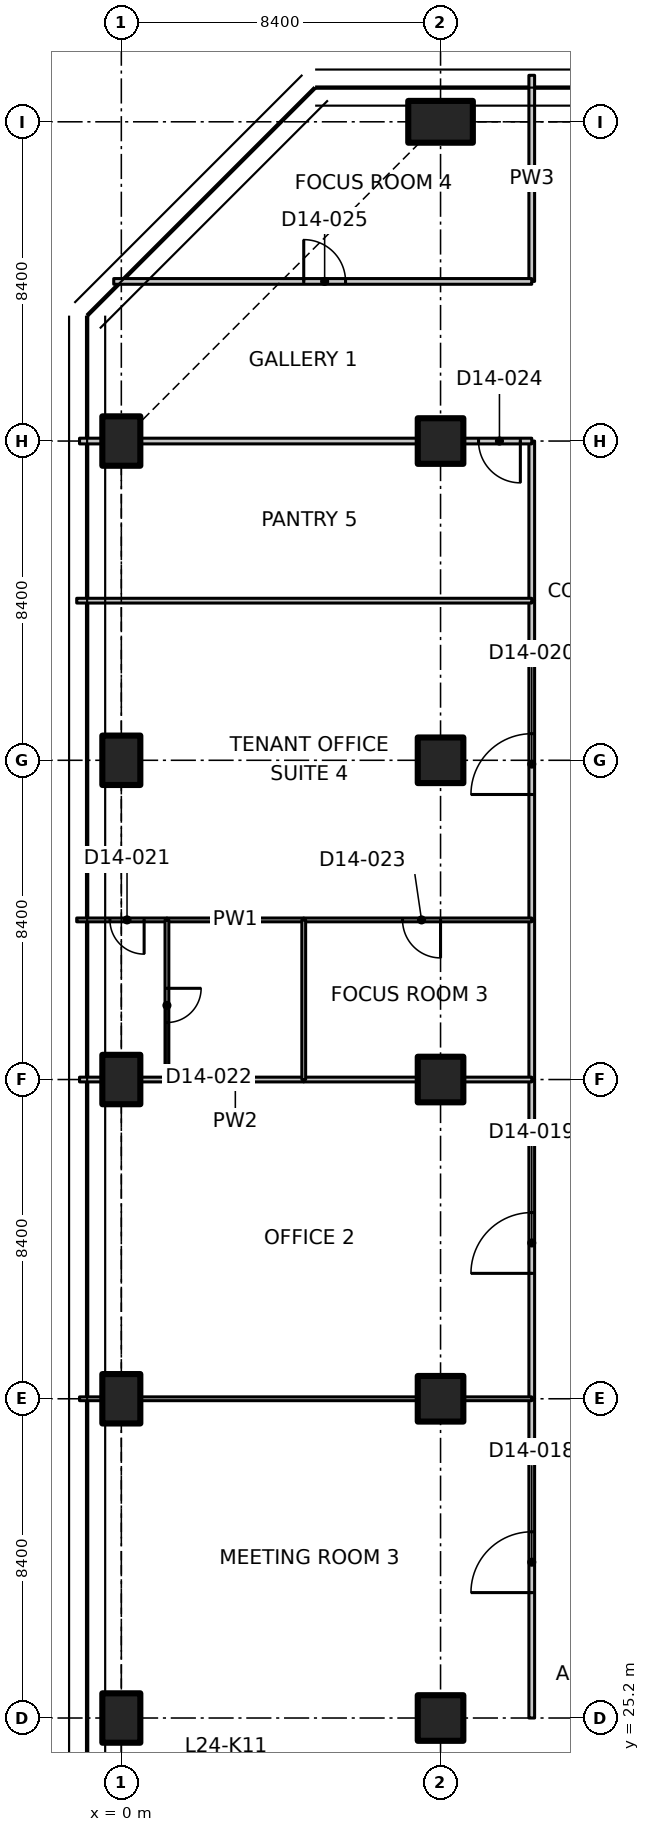
"""IFC4 building model, lengths in metres.
Left out: names, types, materials, properties, quantities, classifications, styles, units other than length and angle.
Written with IfcOpenShell. Run it as: python <this file> out.ifc"""

import sys

from ifc_helpers import new_model, si_unit, direction, frame, frame_2d, origin, origin_2d, place, context, subcontext, project, spatial, polyline, rectangle, outline, extrude, element, fill, save


model = new_model("IFC4")
c1 = context("Model", 3, precision=1e-05, world=origin(), true_north=direction((0.0, 1.0)))
c2 = subcontext(c1, "Body", "Model", "MODEL_VIEW")
j1 = project(units=[si_unit("LENGTHUNIT", "METRE"), si_unit("PLANEANGLEUNIT", "RADIAN")], contexts=[c1])
p1 = place(None, origin())
s1 = spatial("IfcSite", under=j1, at=p1, CompositionType="ELEMENT")
p2 = place(p1, origin())
s2 = spatial("IfcBuilding", under=s1, at=p2, CompositionType="ELEMENT")
p3 = place(p2, frame((0.0, 0.0, 102.5)))
s3 = spatial("IfcBuildingStorey", under=s2, at=p3, CompositionType="ELEMENT", Elevation=102.5)
for number, where, z_axis, x_axis in (
    (1, (0.0, 25.2, 0.0), (0.0, 0.0, 1.0), (1.0, 0.0, 0.0)),
    (2, (0.0, 33.6, 0.0), (0.0, 0.0, 1.0), (1.0, 0.0, 0.0)),
    (3, (0.0, 42.0, 0.0), (0.0, 0.0, 1.0), (1.0, 0.0, 0.0)),
    (4, (0.0, 50.4, 0.0), (0.0, 0.0, 1.0), (1.0, 0.0, 0.0)),
    (5, (0.0, 58.8, 0.0), (0.0, 0.0, 1.0), (1.0, 0.0, 0.0)),
):
    element("IfcColumn", number, at=place(p3, frame(where, z_axis=z_axis, x_axis=x_axis)), inside=s3, PredefinedType="COLUMN", context=c2, shape_type="SweptSolid", body=[
        extrude(rectangle(XDim=1.0, YDim=1.3, at=origin_2d()), origin(), (0.0, 0.0, 1.0), 3.35),
    ])
for number, where, z_axis, x_axis in (
    (6, (8.4, 25.2, 0.0), (0.0, 0.0, 1.0), (1.0, 0.0, 0.0)),
    (7, (8.4, 33.6, 0.0), (0.0, 0.0, 1.0), (1.0, 0.0, 0.0)),
    (8, (8.4, 42.0, 0.0), (0.0, 0.0, 1.0), (1.0, 0.0, 0.0)),
    (9, (8.4, 50.4, 0.0), (0.0, 0.0, 1.0), (1.0, 0.0, 0.0)),
    (10, (8.4, 58.8, 0.0), (0.0, 0.0, 1.0), (1.0, 0.0, 0.0)),
):
    element("IfcColumn", number, at=place(p3, frame(where, z_axis=z_axis, x_axis=x_axis)), inside=s3, PredefinedType="COLUMN", context=c2, shape_type="SweptSolid", body=[
        extrude(rectangle(XDim=1.2, YDim=1.2, at=origin_2d()), origin(), (0.0, 0.0, 1.0), 3.35),
    ])
p4 = place(p3, frame((8.4, 67.2, 0.0), z_axis=(0.0, 0.0, 1.0), x_axis=(0.0, 1.0, 0.0)))
e11 = element("IfcColumn", 11, at=p4, inside=s3, PredefinedType="COLUMN", context=c2, shape_type="SweptSolid", body=[
    extrude(rectangle(XDim=1.1, YDim=1.7, at=origin_2d()), origin(), (0.0, 0.0, 1.0), 3.35),
])
p5 = place(p3, frame((10.8, 25.2, 0.0), z_axis=(0.0, 0.0, 1.0), x_axis=(0.0, 1.0, 0.0)))
e12 = element("IfcWall", 12, at=p5, inside=s3, PredefinedType="PARTITIONING", context=c2, shape_type="SweptSolid", body=[
    extrude(rectangle(XDim=8.4, YDim=0.15, at=frame_2d((4.2, 0.0))), origin(), (0.0, 0.0, 1.0), 3.33),
])
p6 = place(p5, frame((3.3, 0.0, 0.0)))
e13 = element("IfcOpeningElement", 13, at=p6, cuts=e12, PredefinedType="OPENING", context=c2, shape_type="SweptSolid", body=[
    extrude(rectangle(XDim=1.6, YDim=2.1, at=frame_2d((0.8, 1.05))), frame((0.0, 0.085, 0.0), z_axis=(0.0, -1.0, 0.0), x_axis=(1.0, 0.0, 0.0)), (0.0, 0.0, 1.0), 0.17),
])
p7 = place(p3, frame((10.8, 33.6, 0.0), z_axis=(0.0, 0.0, 1.0), x_axis=(0.0, 1.0, 0.0)))
e14 = element("IfcWall", 14, at=p7, inside=s3, PredefinedType="PARTITIONING", context=c2, shape_type="SweptSolid", body=[
    extrude(rectangle(XDim=8.4, YDim=0.15, at=frame_2d((4.2, 0.0))), origin(), (0.0, 0.0, 1.0), 3.33),
])
p8 = place(p7, frame((3.3, 0.0, 0.0)))
e15 = element("IfcOpeningElement", 15, at=p8, cuts=e14, PredefinedType="OPENING", context=c2, shape_type="SweptSolid", body=[
    extrude(rectangle(XDim=1.6, YDim=2.1, at=frame_2d((0.8, 1.05))), frame((0.0, 0.085, 0.0), z_axis=(0.0, -1.0, 0.0), x_axis=(1.0, 0.0, 0.0)), (0.0, 0.0, 1.0), 0.17),
])
p9 = place(p3, frame((10.8, 46.2, 0.0), z_axis=(0.0, 0.0, 1.0), x_axis=(0.0, 1.0, 0.0)))
e16 = element("IfcWall", 16, at=p9, inside=s3, PredefinedType="PARTITIONING", context=c2, shape_type="SweptSolid", body=[
    extrude(rectangle(XDim=8.4, YDim=0.15, at=frame_2d((4.2, 0.0))), origin(), (0.0, 0.0, 1.0), 3.33),
])
p10 = place(p9, frame((3.3, 0.0, 0.0)))
e17 = element("IfcOpeningElement", 17, at=p10, cuts=e16, PredefinedType="OPENING", context=c2, shape_type="SweptSolid", body=[
    extrude(rectangle(XDim=1.6, YDim=2.1, at=frame_2d((0.8, 1.05))), frame((0.0, 0.085, 0.0), z_axis=(0.0, -1.0, 0.0), x_axis=(1.0, 0.0, 0.0)), (0.0, 0.0, 1.0), 0.17),
])
for number, where, z_axis, x_axis in (
    (18, (10.8, 42.0, 0.0), (0.0, 0.0, 1.0), (0.0, 1.0, 0.0)),
    (19, (10.8, 54.6, 0.0), (0.0, 0.0, 1.0), (0.0, 1.0, 0.0)),
):
    element("IfcWall", number, at=place(p3, frame(where, z_axis=z_axis, x_axis=x_axis)), inside=s3, PredefinedType="PARTITIONING", context=c2, shape_type="SweptSolid", body=[
        extrude(rectangle(XDim=4.2, YDim=0.15, at=frame_2d((2.1, 0.0))), origin(), (0.0, 0.0, 1.0), 3.33),
    ])
p11 = place(p3, frame((10.8, 63.0, 0.0), z_axis=(0.0, 0.0, 1.0), x_axis=(0.0, 1.0, 0.0)))
e20 = element("IfcWall", 20, at=p11, inside=s3, PredefinedType="PARTITIONING", context=c2, shape_type="SweptSolid", body=[
    extrude(outline(polyline([(0.0, 0.0), (5.423, 0.0), (5.423, 3.33), (5.28, 3.33), (4.65, 3.33), (4.648, 2.98), (3.752, 2.98), (3.75, 3.33), (0.0, 3.33), (0.0, 0.0)])), frame((0.0, 0.075, 0.0), z_axis=(0.0, -1.0, 0.0), x_axis=(1.0, 0.0, 0.0)), (0.0, 0.0, 1.0), 0.15),
])
p12 = place(p3, frame((10.8, 58.8, 0.0), z_axis=(0.0, 0.0, 1.0), x_axis=(-1.0, 0.0, 0.0)))
e21 = element("IfcWall", 21, at=p12, inside=s3, PredefinedType="PARTITIONING", context=c2, shape_type="SweptSolid", body=[
    extrude(rectangle(XDim=1.78, YDim=0.15, at=frame_2d((0.89, 0.0))), origin(), (0.0, 0.0, 1.0), 3.33),
])
p13 = place(p12, frame((0.3, 0.0, 0.0)))
e22 = element("IfcOpeningElement", 22, at=p13, cuts=e21, PredefinedType="OPENING", context=c2, shape_type="SweptSolid", body=[
    extrude(rectangle(XDim=1.1, YDim=2.1, at=frame_2d((0.55, 1.05))), frame((0.0, 0.085, 0.0), z_axis=(0.0, -1.0, 0.0), x_axis=(1.0, 0.0, 0.0)), (0.0, 0.0, 1.0), 0.17),
])
p14 = place(p3, frame((7.78, 58.8, 0.0), z_axis=(0.0, 0.0, 1.0), x_axis=(-1.0, 0.0, 0.0)))
e23 = element("IfcWall", 23, at=p14, inside=s3, PredefinedType="PARTITIONING", context=c2, shape_type="SweptSolid", body=[
    extrude(outline(polyline([(0.0, 0.0), (7.26, 0.0), (7.26, 2.98), (7.091, 2.98), (7.089, 3.33), (0.0, 3.33), (0.0, 0.0)])), frame((0.0, 0.075, 0.0), z_axis=(0.0, -1.0, 0.0), x_axis=(1.0, 0.0, 0.0)), (0.0, 0.0, 1.0), 0.15),
])
p15 = place(p3, frame((-0.52, 58.8, 0.0), z_axis=(0.0, 0.0, 1.0), x_axis=(-1.0, 0.0, 0.0)))
e24 = element("IfcWall", 24, at=p15, inside=s3, PredefinedType="PARTITIONING", context=c2, shape_type="SweptSolid", body=[
    extrude(rectangle(XDim=0.58, YDim=0.15, at=frame_2d((0.29, 0.0))), origin(), (0.0, 0.0, 1.0), 3.33),
])
p16 = place(p3, frame((-0.2, 63.0, 0.0), z_axis=(0.0, 0.0, 1.0), x_axis=(1.0, 0.0, 0.0)))
e25 = element("IfcWall", 25, at=p16, inside=s3, PredefinedType="PARTITIONING", context=c2, shape_type="SweptSolid", body=[
    extrude(outline(polyline([(0.0, 0.0), (11.0, 0.0), (11.0, 3.33), (5.091, 3.33), (5.089, 2.98), (3.711, 2.98), (3.709, 3.33), (0.0, 3.33), (0.0, 0.0)])), frame((0.0, 0.075, 0.0), z_axis=(0.0, -1.0, 0.0), x_axis=(1.0, 0.0, 0.0)), (0.0, 0.0, 1.0), 0.15),
])
p17 = place(p16, frame((5.0, 0.0, 0.0)))
e26 = element("IfcOpeningElement", 26, at=p17, cuts=e25, PredefinedType="OPENING", context=c2, shape_type="SweptSolid", body=[
    extrude(rectangle(XDim=1.1, YDim=2.1, at=frame_2d((0.55, 1.05))), frame((0.0, 0.085, 0.0), z_axis=(0.0, -1.0, 0.0), x_axis=(1.0, 0.0, 0.0)), (0.0, 0.0, 1.0), 0.17),
])
p18 = place(p3, frame((-1.1, 33.6, 0.0), z_axis=(0.0, 0.0, 1.0), x_axis=(1.0, 0.0, 0.0)))
e27 = element("IfcWall", 27, at=p18, inside=s3, PredefinedType="PARTITIONING", context=c2, shape_type="SweptSolid", body=[
    extrude(rectangle(XDim=0.58, YDim=0.1, at=frame_2d((0.29, 0.0))), origin(), (0.0, 0.0, 1.0), 3.33),
])
p19 = place(p3, frame((0.52, 33.6, 0.0), z_axis=(0.0, 0.0, 1.0), x_axis=(1.0, 0.0, 0.0)))
e28 = element("IfcWall", 28, at=p19, inside=s3, PredefinedType="PARTITIONING", context=c2, shape_type="SweptSolid", body=[
    extrude(rectangle(XDim=7.26, YDim=0.1, at=frame_2d((3.63, 0.0))), origin(), (0.0, 0.0, 1.0), 3.33),
])
p20 = place(p3, frame((9.02, 33.6, 0.0), z_axis=(0.0, 0.0, 1.0), x_axis=(1.0, 0.0, 0.0)))
e29 = element("IfcWall", 29, at=p20, inside=s3, PredefinedType="PARTITIONING", context=c2, shape_type="SweptSolid", body=[
    extrude(rectangle(XDim=1.78, YDim=0.1, at=frame_2d((0.89, 0.0))), origin(), (0.0, 0.0, 1.0), 3.33),
])
p21 = place(p3, frame((-1.1, 42.0, 0.0), z_axis=(0.0, 0.0, 1.0), x_axis=(1.0, 0.0, 0.0)))
e30 = element("IfcWall", 30, at=p21, inside=s3, PredefinedType="PARTITIONING", context=c2, shape_type="SweptSolid", body=[
    extrude(rectangle(XDim=0.58, YDim=0.125, at=frame_2d((0.29, 0.0))), origin(), (0.0, 0.0, 1.0), 3.33),
])
p22 = place(p3, frame((0.52, 42.0, 0.0), z_axis=(0.0, 0.0, 1.0), x_axis=(1.0, 0.0, 0.0)))
e31 = element("IfcWall", 31, at=p22, inside=s3, PredefinedType="PARTITIONING", context=c2, shape_type="SweptSolid", body=[
    extrude(rectangle(XDim=0.68, YDim=0.125, at=frame_2d((0.34, 0.0))), origin(), (0.0, 0.0, 1.0), 3.33),
])
p23 = place(p3, frame((1.2, 42.0, 0.0), z_axis=(0.0, 0.0, 1.0), x_axis=(1.0, 0.0, 0.0)))
e32 = element("IfcWall", 32, at=p23, inside=s3, PredefinedType="PARTITIONING", context=c2, shape_type="SweptSolid", body=[
    extrude(rectangle(XDim=3.6, YDim=0.125, at=frame_2d((1.8, 0.0))), origin(), (0.0, 0.0, 1.0), 3.33),
])
p24 = place(p3, frame((4.8, 42.0, 0.0), z_axis=(0.0, 0.0, 1.0), x_axis=(1.0, 0.0, 0.0)))
e33 = element("IfcWall", 33, at=p24, inside=s3, PredefinedType="PARTITIONING", context=c2, shape_type="SweptSolid", body=[
    extrude(rectangle(XDim=2.98, YDim=0.125, at=frame_2d((1.49, 0.0))), origin(), (0.0, 0.0, 1.0), 3.33),
])
p25 = place(p3, frame((9.02, 42.0, 0.0), z_axis=(0.0, 0.0, 1.0), x_axis=(1.0, 0.0, 0.0)))
e34 = element("IfcWall", 34, at=p25, inside=s3, PredefinedType="PARTITIONING", context=c2, shape_type="SweptSolid", body=[
    extrude(rectangle(XDim=1.78, YDim=0.125, at=frame_2d((0.89, 0.0))), origin(), (0.0, 0.0, 1.0), 3.33),
])
p26 = place(p3, frame((1.2, 46.2, 0.0), z_axis=(0.0, 0.0, 1.0), x_axis=(-1.0, 0.0, 0.0)))
e35 = element("IfcWall", 35, at=p26, inside=s3, PredefinedType="PARTITIONING", context=c2, shape_type="SweptSolid", body=[
    extrude(rectangle(XDim=2.374, YDim=0.1, at=frame_2d((1.187, 0.0))), origin(), (0.0, 0.0, 1.0), 2.98),
])
p27 = place(p26, frame((0.6, 0.0, 0.0)))
e36 = element("IfcOpeningElement", 36, at=p27, cuts=e35, PredefinedType="OPENING", context=c2, shape_type="SweptSolid", body=[
    extrude(rectangle(XDim=0.9, YDim=2.1, at=frame_2d((0.45, 1.05))), frame((0.0, 0.06, 0.0), z_axis=(0.0, -1.0, 0.0), x_axis=(1.0, 0.0, 0.0)), (0.0, 0.0, 1.0), 0.12),
])
p28 = place(p3, frame((4.8, 46.2, 0.0), z_axis=(0.0, 0.0, 1.0), x_axis=(-1.0, 0.0, 0.0)))
e37 = element("IfcWall", 37, at=p28, inside=s3, PredefinedType="PARTITIONING", context=c2, shape_type="SweptSolid", body=[
    extrude(rectangle(XDim=3.6, YDim=0.1, at=frame_2d((1.8, 0.0))), origin(), (0.0, 0.0, 1.0), 3.33),
])
p29 = place(p3, frame((10.8, 46.2, 0.0), z_axis=(0.0, 0.0, 1.0), x_axis=(-1.0, 0.0, 0.0)))
e38 = element("IfcWall", 38, at=p29, inside=s3, PredefinedType="PARTITIONING", context=c2, shape_type="SweptSolid", body=[
    extrude(rectangle(XDim=6.0, YDim=0.1, at=frame_2d((3.0, 0.0))), origin(), (0.0, 0.0, 1.0), 3.33),
])
p30 = place(p29, frame((2.4, 0.0, 0.0)))
e39 = element("IfcOpeningElement", 39, at=p30, cuts=e38, PredefinedType="OPENING", context=c2, shape_type="SweptSolid", body=[
    extrude(rectangle(XDim=1.0, YDim=2.1, at=frame_2d((0.5, 1.05))), frame((0.0, 0.06, 0.0), z_axis=(0.0, -1.0, 0.0), x_axis=(1.0, 0.0, 0.0)), (0.0, 0.0, 1.0), 0.12),
])
p31 = place(p3, frame((-1.174, 54.6, 0.0), z_axis=(0.0, 0.0, 1.0), x_axis=(1.0, 0.0, 0.0)))
e40 = element("IfcWall", 40, at=p31, inside=s3, PredefinedType="PARTITIONING", context=c2, shape_type="SweptSolid", body=[
    extrude(outline(polyline([(0.0, 0.0), (11.974, 0.0), (11.974, 3.33), (1.624, 3.33), (1.622, 2.98), (0.726, 2.98), (0.724, 3.33), (0.074, 3.33), (0.0, 3.33), (0.0, 0.0)])), frame((0.0, 0.062, 0.0), z_axis=(0.0, -1.0, 0.0), x_axis=(1.0, 0.0, 0.0)), (0.0, 0.0, 1.0), 0.125),
])
p32 = place(p3, frame((1.2, 46.2, 0.0), z_axis=(0.0, 0.0, 1.0), x_axis=(0.0, -1.0, 0.0)))
e41 = element("IfcWall", 41, at=p32, inside=s3, PredefinedType="PARTITIONING", context=c2, shape_type="SweptSolid", body=[
    extrude(rectangle(XDim=4.2, YDim=0.1, at=frame_2d((2.1, 0.0))), origin(), (0.0, 0.0, 1.0), 3.33),
])
p33 = place(p32, frame((1.8, 0.0, 0.0)))
e42 = element("IfcOpeningElement", 42, at=p33, cuts=e41, PredefinedType="OPENING", context=c2, shape_type="SweptSolid", body=[
    extrude(rectangle(XDim=0.9, YDim=2.1, at=frame_2d((0.45, 1.05))), frame((0.0, 0.06, 0.0), z_axis=(0.0, -1.0, 0.0), x_axis=(1.0, 0.0, 0.0)), (0.0, 0.0, 1.0), 0.12),
])
p34 = place(p3, frame((4.8, 46.2, 0.0), z_axis=(0.0, 0.0, 1.0), x_axis=(0.0, -1.0, 0.0)))
e43 = element("IfcWall", 43, at=p34, inside=s3, PredefinedType="PARTITIONING", context=c2, shape_type="SweptSolid", body=[
    extrude(rectangle(XDim=4.2, YDim=0.1, at=frame_2d((2.1, 0.0))), origin(), (0.0, 0.0, 1.0), 3.33),
])
p35 = place(p6, origin())
e44 = element("IfcDoor", 44, at=p35, inside=s3, OperationType="DOUBLE_DOOR_SINGLE_SWING", PredefinedType="DOOR", context=c2, shape_type="SweptSolid", body=[
    extrude(rectangle(XDim=1.6, YDim=2.1, at=frame_2d((0.8, 1.05))), frame((0.0, 0.025, 0.0), z_axis=(0.0, -1.0, 0.0), x_axis=(1.0, 0.0, 0.0)), (0.0, 0.0, 1.0), 0.05),
])
fill(e13, e44)
p36 = place(p8, origin())
e45 = element("IfcDoor", 45, at=p36, inside=s3, OperationType="DOUBLE_DOOR_SINGLE_SWING", PredefinedType="DOOR", context=c2, shape_type="SweptSolid", body=[
    extrude(rectangle(XDim=1.6, YDim=2.1, at=frame_2d((0.8, 1.05))), frame((0.0, 0.025, 0.0), z_axis=(0.0, -1.0, 0.0), x_axis=(1.0, 0.0, 0.0)), (0.0, 0.0, 1.0), 0.05),
])
fill(e15, e45)
p37 = place(p10, origin())
e46 = element("IfcDoor", 46, at=p37, inside=s3, OperationType="DOUBLE_DOOR_SINGLE_SWING", PredefinedType="DOOR", context=c2, shape_type="SweptSolid", body=[
    extrude(rectangle(XDim=1.6, YDim=2.1, at=frame_2d((0.8, 1.05))), frame((0.0, 0.025, 0.0), z_axis=(0.0, -1.0, 0.0), x_axis=(1.0, 0.0, 0.0)), (0.0, 0.0, 1.0), 0.05),
])
fill(e17, e46)
p38 = place(p27, origin())
e47 = element("IfcDoor", 47, at=p38, inside=s3, OperationType="SINGLE_SWING_LEFT", PredefinedType="DOOR", context=c2, shape_type="SweptSolid", body=[
    extrude(rectangle(XDim=0.9, YDim=2.1, at=frame_2d((0.45, 1.05))), frame((0.0, 0.025, 0.0), z_axis=(0.0, -1.0, 0.0), x_axis=(1.0, 0.0, 0.0)), (0.0, 0.0, 1.0), 0.05),
])
fill(e36, e47)
p39 = place(p33, origin())
e48 = element("IfcDoor", 48, at=p39, inside=s3, OperationType="SINGLE_SWING_LEFT", PredefinedType="DOOR", context=c2, shape_type="SweptSolid", body=[
    extrude(rectangle(XDim=0.9, YDim=2.1, at=frame_2d((0.45, 1.05))), frame((0.0, 0.025, 0.0), z_axis=(0.0, -1.0, 0.0), x_axis=(1.0, 0.0, 0.0)), (0.0, 0.0, 1.0), 0.05),
])
fill(e42, e48)
p40 = place(p30, origin())
e49 = element("IfcDoor", 49, at=p40, inside=s3, OperationType="SINGLE_SWING_LEFT", PredefinedType="DOOR", context=c2, shape_type="SweptSolid", body=[
    extrude(rectangle(XDim=1.0, YDim=2.1, at=frame_2d((0.5, 1.05))), frame((0.0, 0.025, 0.0), z_axis=(0.0, -1.0, 0.0), x_axis=(1.0, 0.0, 0.0)), (0.0, 0.0, 1.0), 0.05),
])
fill(e39, e49)
p41 = place(p13, origin())
e50 = element("IfcDoor", 50, at=p41, inside=s3, OperationType="SINGLE_SWING_LEFT", PredefinedType="DOOR", context=c2, shape_type="SweptSolid", body=[
    extrude(rectangle(XDim=1.1, YDim=2.1, at=frame_2d((0.55, 1.05))), frame((0.0, 0.025, 0.0), z_axis=(0.0, -1.0, 0.0), x_axis=(1.0, 0.0, 0.0)), (0.0, 0.0, 1.0), 0.05),
])
fill(e22, e50)
p42 = place(p17, origin())
e51 = element("IfcDoor", 51, at=p42, inside=s3, OperationType="SINGLE_SWING_LEFT", PredefinedType="DOOR", context=c2, shape_type="SweptSolid", body=[
    extrude(rectangle(XDim=1.1, YDim=2.1, at=frame_2d((0.55, 1.05))), frame((0.0, 0.025, 0.0), z_axis=(0.0, -1.0, 0.0), x_axis=(1.0, 0.0, 0.0)), (0.0, 0.0, 1.0), 0.05),
])
fill(e26, e51)
save(model, sys.argv[1])
